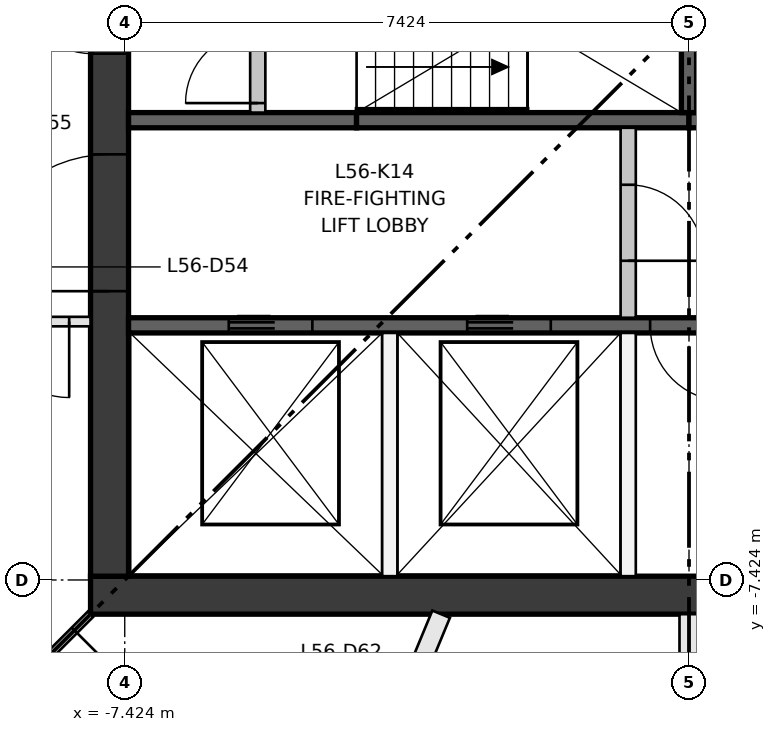
"""IFC4 building model, lengths in metres.
Left out: names, types, materials, properties, quantities, classifications, styles, units other than length and angle.
Written with IfcOpenShell. Run it as: python <this file> out.ifc"""

import sys

from ifc_helpers import new_model, si_unit, direction, frame, frame_2d, origin, place, context, subcontext, project, spatial, rectangle, extrude, element, fill, save


model = new_model("IFC4")
c1 = context("Model", 3, precision=1e-05, world=origin(), true_north=direction((0.0, 1.0)))
c2 = subcontext(c1, "Body", "Model", "MODEL_VIEW")
j1 = project(units=[si_unit("LENGTHUNIT", "METRE"), si_unit("PLANEANGLEUNIT", "RADIAN")], contexts=[c1])
p1 = place(None, origin())
s1 = spatial("IfcSite", under=j1, at=p1, CompositionType="ELEMENT")
p2 = place(p1, origin())
s2 = spatial("IfcBuilding", under=s1, at=p2, CompositionType="ELEMENT")
p3 = place(p2, frame((0.0, 0.0, 207.75)))
s3 = spatial("IfcBuildingStorey", under=s2, at=p3, CompositionType="ELEMENT", Elevation=207.75)
p4 = place(p3, frame((-7.874, -7.624, 0.0), z_axis=(0.0, 0.0, 1.0), x_axis=(1.0, 0.0, 0.0)))
e1 = element("IfcWall", 1, at=p4, inside=s3, PredefinedType="SHEAR", context=c2, shape_type="SweptSolid", body=[
    extrude(rectangle(XDim=15.748, YDim=0.5, at=frame_2d((7.874, 0.0))), origin(), (0.0, 0.0, 1.0), 3.35),
])
p5 = place(p3, frame((-7.624, -7.374, 0.0), z_axis=(0.0, 0.0, 1.0), x_axis=(0.0, 1.0, 0.0)))
e2 = element("IfcWall", 2, at=p5, inside=s3, PredefinedType="SHEAR", context=c2, shape_type="SweptSolid", body=[
    extrude(rectangle(XDim=14.748, YDim=0.5, at=frame_2d((7.374, 0.0))), origin(), (0.0, 0.0, 1.0), 3.35),
])
p6 = place(p5, frame((6.874, 0.0, 0.0)))
e3 = element("IfcOpeningElement", 3, at=p6, cuts=e2, PredefinedType="OPENING", context=c2, shape_type="SweptSolid", body=[
    extrude(rectangle(XDim=1.0, YDim=2.1, at=frame_2d((0.5, 1.05))), frame((0.0, 0.26, 0.0), z_axis=(0.0, -1.0, 0.0), x_axis=(1.0, 0.0, 0.0)), (0.0, 0.0, 1.0), 0.52),
])
p7 = place(p5, frame((3.75, 0.0, 0.0)))
e4 = element("IfcOpeningElement", 4, at=p7, cuts=e2, PredefinedType="OPENING", context=c2, shape_type="SweptSolid", body=[
    extrude(rectangle(XDim=1.8, YDim=2.1, at=frame_2d((0.9, 1.05))), frame((0.0, 0.26, 0.0), z_axis=(0.0, -1.0, 0.0), x_axis=(1.0, 0.0, 0.0)), (0.0, 0.0, 1.0), 0.52),
])
p8 = place(p5, frame((9.198, 0.0, 0.0)))
e5 = element("IfcOpeningElement", 5, at=p8, cuts=e2, PredefinedType="OPENING", context=c2, shape_type="SweptSolid", body=[
    extrude(rectangle(XDim=1.8, YDim=2.1, at=frame_2d((0.9, 1.05))), frame((0.0, 0.26, 0.0), z_axis=(0.0, -1.0, 0.0), x_axis=(1.0, 0.0, 0.0)), (0.0, 0.0, 1.0), 0.52),
])
p9 = place(p3, frame((-7.374, -4.074, 0.0), z_axis=(0.0, 0.0, 1.0), x_axis=(1.0, 0.0, 0.0)))
e6 = element("IfcWall", 6, at=p9, inside=s3, PredefinedType="SHEAR", context=c2, shape_type="SweptSolid", body=[
    extrude(rectangle(XDim=14.748, YDim=0.2, at=frame_2d((7.374, 0.0))), origin(), (0.0, 0.0, 1.0), 3.0),
])
p10 = place(p9, frame((1.319, 0.0, 0.0)))
e7 = element("IfcOpeningElement", 7, at=p10, cuts=e6, PredefinedType="OPENING", context=c2, shape_type="SweptSolid", body=[
    extrude(rectangle(XDim=1.1, YDim=2.1, at=frame_2d((0.55, 1.05))), frame((0.0, 0.11, 0.0), z_axis=(0.0, -1.0, 0.0), x_axis=(1.0, 0.0, 0.0)), (0.0, 0.0, 1.0), 0.22),
])
p11 = place(p9, frame((4.456, 0.0, 0.0)))
e8 = element("IfcOpeningElement", 8, at=p11, cuts=e6, PredefinedType="OPENING", context=c2, shape_type="SweptSolid", body=[
    extrude(rectangle(XDim=1.1, YDim=2.1, at=frame_2d((0.55, 1.05))), frame((0.0, 0.11, 0.0), z_axis=(0.0, -1.0, 0.0), x_axis=(1.0, 0.0, 0.0)), (0.0, 0.0, 1.0), 0.22),
])
p12 = place(p9, frame((6.862, 0.0, 0.0)))
e9 = element("IfcOpeningElement", 9, at=p12, cuts=e6, PredefinedType="OPENING", context=c2, shape_type="SweptSolid", body=[
    extrude(rectangle(XDim=1.0, YDim=2.1, at=frame_2d((0.5, 1.05))), frame((0.0, 0.11, 0.0), z_axis=(0.0, -1.0, 0.0), x_axis=(1.0, 0.0, 0.0)), (0.0, 0.0, 1.0), 0.22),
])
p13 = place(p9, frame((8.439, 0.0, 0.0)))
e10 = element("IfcOpeningElement", 10, at=p13, cuts=e6, PredefinedType="OPENING", context=c2, shape_type="SweptSolid", body=[
    extrude(rectangle(XDim=1.0, YDim=2.1, at=frame_2d((0.5, 1.05))), frame((0.0, 0.11, 0.0), z_axis=(0.0, -1.0, 0.0), x_axis=(1.0, 0.0, 0.0)), (0.0, 0.0, 1.0), 0.22),
])
p14 = place(p9, frame((10.509, 0.0, 0.0)))
e11 = element("IfcOpeningElement", 11, at=p14, cuts=e6, PredefinedType="OPENING", context=c2, shape_type="SweptSolid", body=[
    extrude(rectangle(XDim=0.8, YDim=2.1, at=frame_2d((0.4, 1.05))), frame((0.0, 0.11, 0.0), z_axis=(0.0, -1.0, 0.0), x_axis=(1.0, 0.0, 0.0)), (0.0, 0.0, 1.0), 0.22),
])
p15 = place(p9, frame((12.969, 0.0, 0.0)))
e12 = element("IfcOpeningElement", 12, at=p15, cuts=e6, PredefinedType="OPENING", context=c2, shape_type="SweptSolid", body=[
    extrude(rectangle(XDim=1.0, YDim=2.1, at=frame_2d((0.5, 1.05))), frame((0.0, 0.11, 0.0), z_axis=(0.0, -1.0, 0.0), x_axis=(1.0, 0.0, 0.0)), (0.0, 0.0, 1.0), 0.22),
])
p16 = place(p3, frame((-7.374, -1.375, 0.0), z_axis=(0.0, 0.0, 1.0), x_axis=(1.0, 0.0, 0.0)))
e13 = element("IfcWall", 13, at=p16, inside=s3, PredefinedType="SHEAR", context=c2, shape_type="SweptSolid", body=[
    extrude(rectangle(XDim=3.0, YDim=0.2, at=frame_2d((1.5, 0.0))), origin(), (0.0, 0.0, 1.0), 3.0),
])
for number, where, z_axis, x_axis in (
    (14, (-4.374, -1.375, 0.0), (0.0, 0.0, 1.0), (1.0, 0.0, 0.0)),
    (15, (0.0, -1.375, 0.0), (0.0, 0.0, 1.0), (1.0, 0.0, 0.0)),
):
    element("IfcWall", number, at=place(p3, frame(where, z_axis=z_axis, x_axis=x_axis)), inside=s3, PredefinedType="SHEAR", context=c2, shape_type="SweptSolid", body=[
        extrude(rectangle(XDim=4.374, YDim=0.2, at=frame_2d((2.187, 0.0))), origin(), (0.0, 0.0, 1.0), 3.0),
    ])
p17 = place(p3, frame((0.0, -1.275, 0.0), z_axis=(0.0, 0.0, 1.0), x_axis=(0.0, 1.0, 0.0)))
e16 = element("IfcWall", 16, at=p17, inside=s3, PredefinedType="SHEAR", context=c2, shape_type="SweptSolid", body=[
    extrude(rectangle(XDim=2.55, YDim=0.2, at=frame_2d((1.275, 0.0))), origin(), (0.0, 0.0, 1.0), 3.0),
])
for number, where, z_axis, x_axis in (
    (17, (-3.937, -7.374, 0.0), (0.0, 0.0, 1.0), (0.0, 1.0, 0.0)),
    (18, (-0.8, -7.374, 0.0), (0.0, 0.0, 1.0), (0.0, 1.0, 0.0)),
):
    element("IfcWall", number, at=place(p3, frame(where, z_axis=z_axis, x_axis=x_axis)), inside=s3, PredefinedType="PARTITIONING", context=c2, shape_type="SweptSolid", body=[
        extrude(rectangle(XDim=3.2, YDim=0.2, at=frame_2d((1.6, 0.0))), origin(), (0.0, 0.0, 1.0), 3.0),
    ])
p18 = place(p3, frame((-0.8, -3.974, 0.0), z_axis=(0.0, 0.0, 1.0), x_axis=(0.0, 1.0, 0.0)))
e19 = element("IfcWall", 19, at=p18, inside=s3, PredefinedType="PARTITIONING", context=c2, shape_type="SweptSolid", body=[
    extrude(rectangle(XDim=2.499, YDim=0.2, at=frame_2d((1.25, 0.0))), origin(), (0.0, 0.0, 1.0), 3.0),
])
p19 = place(p18, frame((0.75, 0.0, 0.0)))
e20 = element("IfcOpeningElement", 20, at=p19, cuts=e19, PredefinedType="OPENING", context=c2, shape_type="SweptSolid", body=[
    extrude(rectangle(XDim=1.0, YDim=2.1, at=frame_2d((0.5, 1.05))), frame((0.0, 0.11, 0.0), z_axis=(0.0, -1.0, 0.0), x_axis=(1.0, 0.0, 0.0)), (0.0, 0.0, 1.0), 0.22),
])
p20 = place(p3, frame((-5.674, -1.275, 0.0), z_axis=(0.0, 0.0, 1.0), x_axis=(0.0, 1.0, 0.0)))
e21 = element("IfcWall", 21, at=p20, inside=s3, PredefinedType="PARTITIONING", context=c2, shape_type="SweptSolid", body=[
    extrude(rectangle(XDim=2.55, YDim=0.2, at=frame_2d((1.275, 0.0))), origin(), (0.0, 0.0, 1.0), 3.0),
])
p21 = place(p20, frame((0.125, 0.0, 0.0)))
e22 = element("IfcOpeningElement", 22, at=p21, cuts=e21, PredefinedType="OPENING", context=c2, shape_type="SweptSolid", body=[
    extrude(rectangle(XDim=0.95, YDim=2.1, at=frame_2d((0.475, 1.05))), frame((0.0, 0.11, 0.0), z_axis=(0.0, -1.0, 0.0), x_axis=(1.0, 0.0, 0.0)), (0.0, 0.0, 1.0), 0.22),
])
p22 = place(p20, frame((1.475, 0.0, 0.0)))
e23 = element("IfcOpeningElement", 23, at=p22, cuts=e21, PredefinedType="OPENING", context=c2, shape_type="SweptSolid", body=[
    extrude(rectangle(XDim=0.95, YDim=2.1, at=frame_2d((0.475, 1.05))), frame((0.0, 0.11, 0.0), z_axis=(0.0, -1.0, 0.0), x_axis=(1.0, 0.0, 0.0)), (0.0, 0.0, 1.0), 0.22),
])
p23 = place(p3, frame((-7.874, -4.024, 0.0), z_axis=(0.0, 0.0, 1.0), x_axis=(-1.0, 0.0, 0.0)))
e24 = element("IfcWall", 24, at=p23, inside=s3, PredefinedType="PARTITIONING", context=c2, shape_type="SweptSolid", body=[
    extrude(rectangle(XDim=1.562, YDim=0.125, at=frame_2d((0.781, 0.0))), origin(), (0.0, 0.0, 1.0), 3.0),
])
p24 = place(p23, frame((0.281, 0.0, 0.0)))
e25 = element("IfcOpeningElement", 25, at=p24, cuts=e24, PredefinedType="OPENING", context=c2, shape_type="SweptSolid", body=[
    extrude(rectangle(XDim=1.0, YDim=2.1, at=frame_2d((0.5, 1.05))), frame((0.0, 0.073, 0.0), z_axis=(0.0, -1.0, 0.0), x_axis=(1.0, 0.0, 0.0)), (0.0, 0.0, 1.0), 0.145),
])
p25 = place(p3, frame((-7.874, -7.874, 0.0), z_axis=(0.0, 0.0, 1.0), x_axis=(-0.707106781187, -0.707106781187, 0.0)))
e26 = element("IfcWall", 26, at=p25, inside=s3, PredefinedType="PARTITIONING", context=c2, shape_type="SweptSolid", body=[
    extrude(rectangle(XDim=4.334, YDim=0.1, at=frame_2d((2.167, 0.0))), origin(), (0.0, 0.0, 1.0), 3.0),
])
p26 = place(p25, frame((0.3, 0.0, 0.0)))
e27 = element("IfcOpeningElement", 27, at=p26, cuts=e26, PredefinedType="OPENING", context=c2, shape_type="SweptSolid", body=[
    extrude(rectangle(XDim=1.0, YDim=2.1, at=frame_2d((0.5, 1.05))), frame((0.0, 0.06, 0.0), z_axis=(0.0, -1.0, 0.0), x_axis=(1.0, 0.0, 0.0)), (0.0, 0.0, 1.0), 0.12),
])
p27 = place(p3, frame((-3.261, -7.874, 0.0), z_axis=(0.0, 0.0, 1.0), x_axis=(-0.382686527355, -0.923878250519, 0.0)))
e28 = element("IfcWall", 28, at=p27, inside=s3, PredefinedType="PARTITIONING", context=c2, shape_type="SweptSolid", body=[
    extrude(rectangle(XDim=2.877, YDim=0.25, at=frame_2d((1.438, 0.0))), origin(), (0.0, 0.0, 1.0), 3.0),
])
p28 = place(p27, frame((0.9, 0.0, 0.0)))
e29 = element("IfcOpeningElement", 29, at=p28, cuts=e28, PredefinedType="OPENING", context=c2, shape_type="SweptSolid", body=[
    extrude(rectangle(XDim=1.0, YDim=2.1, at=frame_2d((0.5, 1.05))), frame((0.0, 0.135, 0.0), z_axis=(0.0, -1.0, 0.0), x_axis=(1.0, 0.0, 0.0)), (0.0, 0.0, 1.0), 0.27),
])
p29 = place(p3, frame((0.0, -7.874, 0.0), z_axis=(0.0, 0.0, 1.0), x_axis=(0.0, -1.0, 0.0)))
e30 = element("IfcWall", 30, at=p29, inside=s3, PredefinedType="PARTITIONING", context=c2, shape_type="SweptSolid", body=[
    extrude(rectangle(XDim=3.526, YDim=0.25, at=frame_2d((1.763, 0.0))), origin(), (0.0, 0.0, 1.0), 3.0),
])
p30 = place(p10, origin())
e31 = element("IfcDoor", 31, at=p30, inside=s3, OperationType="DOUBLE_DOOR_SLIDING", PredefinedType="DOOR", context=c2, shape_type="SweptSolid", body=[
    extrude(rectangle(XDim=1.1, YDim=2.1, at=frame_2d((0.55, 1.05))), frame((0.0, 0.025, 0.0), z_axis=(0.0, -1.0, 0.0), x_axis=(1.0, 0.0, 0.0)), (0.0, 0.0, 1.0), 0.05),
])
fill(e7, e31)
p31 = place(p11, origin())
e32 = element("IfcDoor", 32, at=p31, inside=s3, OperationType="DOUBLE_DOOR_SLIDING", PredefinedType="DOOR", context=c2, shape_type="SweptSolid", body=[
    extrude(rectangle(XDim=1.1, YDim=2.1, at=frame_2d((0.55, 1.05))), frame((0.0, 0.025, 0.0), z_axis=(0.0, -1.0, 0.0), x_axis=(1.0, 0.0, 0.0)), (0.0, 0.0, 1.0), 0.05),
])
fill(e8, e32)
p32 = place(p21, origin())
e33 = element("IfcDoor", 33, at=p32, inside=s3, OperationType="SINGLE_SWING_LEFT", PredefinedType="DOOR", context=c2, shape_type="SweptSolid", body=[
    extrude(rectangle(XDim=0.95, YDim=2.1, at=frame_2d((0.475, 1.05))), frame((0.0, 0.025, 0.0), z_axis=(0.0, -1.0, 0.0), x_axis=(1.0, 0.0, 0.0)), (0.0, 0.0, 1.0), 0.05),
])
fill(e22, e33)
p33 = place(p19, frame((1.0, 0.0, 0.0), z_axis=(0.0, 0.0, 1.0), x_axis=(-1.0, 0.0, 0.0)))
e34 = element("IfcDoor", 34, at=p33, inside=s3, OperationType="SINGLE_SWING_LEFT", PredefinedType="DOOR", context=c2, shape_type="SweptSolid", body=[
    extrude(rectangle(XDim=1.0, YDim=2.1, at=frame_2d((0.5, 1.05))), frame((0.0, 0.025, 0.0), z_axis=(0.0, -1.0, 0.0), x_axis=(1.0, 0.0, 0.0)), (0.0, 0.0, 1.0), 0.05),
])
fill(e20, e34)
p34 = place(p12, frame((1.0, 0.0, 0.0), z_axis=(0.0, 0.0, 1.0), x_axis=(-1.0, 0.0, 0.0)))
e35 = element("IfcDoor", 35, at=p34, inside=s3, OperationType="SINGLE_SWING_RIGHT", PredefinedType="DOOR", context=c2, shape_type="SweptSolid", body=[
    extrude(rectangle(XDim=1.0, YDim=2.1, at=frame_2d((0.5, 1.05))), frame((0.0, 0.025, 0.0), z_axis=(0.0, -1.0, 0.0), x_axis=(1.0, 0.0, 0.0)), (0.0, 0.0, 1.0), 0.05),
])
fill(e9, e35)
p35 = place(p6, origin())
e36 = element("IfcDoor", 36, at=p35, inside=s3, OperationType="SINGLE_SWING_RIGHT", PredefinedType="DOOR", context=c2, shape_type="SweptSolid", body=[
    extrude(rectangle(XDim=1.0, YDim=2.1, at=frame_2d((0.5, 1.05))), frame((0.0, 0.25, 0.0), z_axis=(0.0, -1.0, 0.0), x_axis=(1.0, 0.0, 0.0)), (0.0, 0.0, 1.0), 0.05),
])
fill(e3, e36)
p36 = place(p7, origin())
e37 = element("IfcDoor", 37, at=p36, inside=s3, OperationType="DOUBLE_DOOR_SINGLE_SWING", PredefinedType="DOOR", context=c2, shape_type="SweptSolid", body=[
    extrude(rectangle(XDim=1.8, YDim=2.1, at=frame_2d((0.9, 1.05))), frame((0.0, 0.025, 0.0), z_axis=(0.0, -1.0, 0.0), x_axis=(1.0, 0.0, 0.0)), (0.0, 0.0, 1.0), 0.05),
])
fill(e4, e37)
p37 = place(p24, origin())
e38 = element("IfcDoor", 38, at=p37, inside=s3, OperationType="SINGLE_SWING_LEFT", PredefinedType="DOOR", context=c2, shape_type="SweptSolid", body=[
    extrude(rectangle(XDim=1.0, YDim=2.1, at=frame_2d((0.5, 1.05))), frame((0.0, 0.025, 0.0), z_axis=(0.0, -1.0, 0.0), x_axis=(1.0, 0.0, 0.0)), (0.0, 0.0, 1.0), 0.05),
])
fill(e25, e38)
p38 = place(p26, origin())
e39 = element("IfcDoor", 39, at=p38, inside=s3, OperationType="SINGLE_SWING_LEFT", PredefinedType="DOOR", context=c2, shape_type="SweptSolid", body=[
    extrude(rectangle(XDim=1.0, YDim=2.1, at=frame_2d((0.5, 1.05))), frame((0.0, 0.025, 0.0), z_axis=(0.0, -1.0, 0.0), x_axis=(1.0, 0.0, 0.0)), (0.0, 0.0, 1.0), 0.05),
])
fill(e27, e39)
save(model, sys.argv[1])
